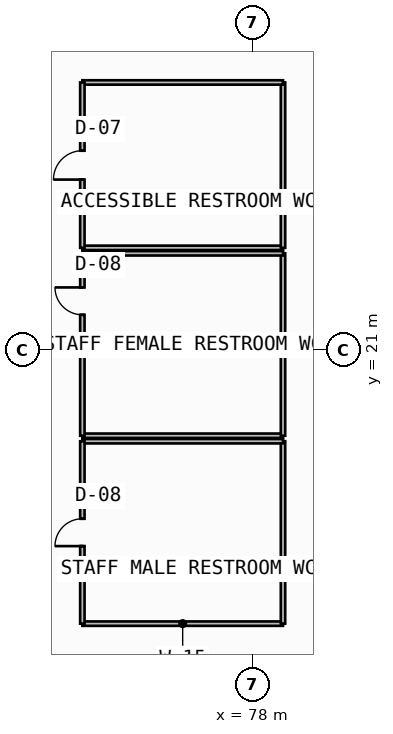
"""IFC4 building model, lengths in metres.
Left out: names, types, materials, properties, quantities, classifications, styles, units other than length and angle.
Written with IfcOpenShell. Run it as: python <this file> out.ifc"""

import sys

from ifc_helpers import new_model, si_unit, direction, frame, frame_2d, origin, place, context, subcontext, project, spatial, rectangle, extrude, element, fill, save


model = new_model("IFC4")
c1 = context("Model", 3, precision=1e-05, world=origin(), true_north=direction((0.0, 1.0)))
c2 = subcontext(c1, "Body", "Model", "MODEL_VIEW")
j1 = project(units=[si_unit("LENGTHUNIT", "METRE"), si_unit("PLANEANGLEUNIT", "RADIAN")], contexts=[c1])
p1 = place(None, origin())
s1 = spatial("IfcSite", under=j1, at=p1, CompositionType="ELEMENT")
p2 = place(p1, origin())
s2 = spatial("IfcBuilding", under=s1, at=p2, CompositionType="ELEMENT")
p3 = place(p2, frame((0.0, 0.0, -6.0)))
s3 = spatial("IfcBuildingStorey", under=s2, at=p3, CompositionType="ELEMENT", Elevation=-6.0)
p4 = place(p3, frame((72.4, 12.0, 0.0), z_axis=(0.0, 0.0, 1.0), x_axis=(1.0, 0.0, 0.0)))
e1 = element("IfcWall", 1, at=p4, inside=s3, PredefinedType="PARTITIONING", context=c2, shape_type="SweptSolid", body=[
    extrude(rectangle(XDim=6.6, YDim=0.145, at=frame_2d((3.3, 0.0))), origin(), (0.0, 0.0, 1.0), 5.085),
])
p5 = place(p3, frame((79.0, 12.0, 0.0), z_axis=(0.0, 0.0, 1.0), x_axis=(0.0, 1.0, 0.0)))
e2 = element("IfcWall", 2, at=p5, inside=s3, PredefinedType="PARTITIONING", context=c2, shape_type="SweptSolid", body=[
    extrude(rectangle(XDim=6.0, YDim=0.145, at=frame_2d((3.0, 0.0))), origin(), (0.0, 0.0, 1.0), 5.6),
])
p6 = place(p3, frame((79.0, 18.0, 0.0), z_axis=(0.0, 0.0, 1.0), x_axis=(-1.0, 0.0, 0.0)))
e3 = element("IfcWall", 3, at=p6, inside=s3, PredefinedType="PARTITIONING", context=c2, shape_type="SweptSolid", body=[
    extrude(rectangle(XDim=6.6, YDim=0.145, at=frame_2d((3.3, 0.0))), origin(), (0.0, 0.0, 1.0), 5.085),
])
p7 = place(p3, frame((72.4, 18.0, 0.0), z_axis=(0.0, 0.0, 1.0), x_axis=(0.0, -1.0, 0.0)))
e4 = element("IfcWall", 4, at=p7, inside=s3, PredefinedType="PARTITIONING", context=c2, shape_type="SweptSolid", body=[
    extrude(rectangle(XDim=6.0, YDim=0.145, at=frame_2d((3.0, 0.0))), origin(), (0.0, 0.0, 1.0), 5.6),
])
p8 = place(p7, frame((2.55, 0.0, 0.0)))
e5 = element("IfcOpeningElement", 5, at=p8, cuts=e4, PredefinedType="OPENING", context=c2, shape_type="SweptSolid", body=[
    extrude(rectangle(XDim=0.9, YDim=2.1, at=frame_2d((0.45, 1.05))), frame((0.0, 0.083, 0.0), z_axis=(0.0, -1.0, 0.0), x_axis=(1.0, 0.0, 0.0)), (0.0, 0.0, 1.0), 0.165),
])
p9 = place(p3, frame((72.4, 18.18, 0.0), z_axis=(0.0, 0.0, 1.0), x_axis=(1.0, 0.0, 0.0)))
e6 = element("IfcWall", 6, at=p9, inside=s3, PredefinedType="PARTITIONING", context=c2, shape_type="SweptSolid", body=[
    extrude(rectangle(XDim=6.6, YDim=0.145, at=frame_2d((3.3, 0.0))), origin(), (0.0, 0.0, 1.0), 5.085),
])
p10 = place(p3, frame((79.0, 18.18, 0.0), z_axis=(0.0, 0.0, 1.0), x_axis=(0.0, 1.0, 0.0)))
e7 = element("IfcWall", 7, at=p10, inside=s3, PredefinedType="PARTITIONING", context=c2, shape_type="SweptSolid", body=[
    extrude(rectangle(XDim=6.0, YDim=0.145, at=frame_2d((3.0, 0.0))), origin(), (0.0, 0.0, 1.0), 4.885),
])
p11 = place(p3, frame((79.0, 24.18, 0.0), z_axis=(0.0, 0.0, 1.0), x_axis=(-1.0, 0.0, 0.0)))
e8 = element("IfcWall", 8, at=p11, inside=s3, PredefinedType="PARTITIONING", context=c2, shape_type="SweptSolid", body=[
    extrude(rectangle(XDim=6.6, YDim=0.145, at=frame_2d((3.3, 0.0))), origin(), (0.0, 0.0, 1.0), 5.6),
])
p12 = place(p3, frame((72.4, 24.18, 0.0), z_axis=(0.0, 0.0, 1.0), x_axis=(0.0, -1.0, 0.0)))
e9 = element("IfcWall", 9, at=p12, inside=s3, PredefinedType="PARTITIONING", context=c2, shape_type="SweptSolid", body=[
    extrude(rectangle(XDim=6.0, YDim=0.145, at=frame_2d((3.0, 0.0))), origin(), (0.0, 0.0, 1.0), 4.885),
])
p13 = place(p12, frame((1.122, 0.0, 0.0)))
e10 = element("IfcOpeningElement", 10, at=p13, cuts=e9, PredefinedType="OPENING", context=c2, shape_type="SweptSolid", body=[
    extrude(rectangle(XDim=0.9, YDim=2.1, at=frame_2d((0.45, 1.05))), frame((0.0, 0.083, 0.0), z_axis=(0.0, -1.0, 0.0), x_axis=(1.0, 0.0, 0.0)), (0.0, 0.0, 1.0), 0.165),
])
p14 = place(p3, frame((72.4, 24.36, 0.0), z_axis=(0.0, 0.0, 1.0), x_axis=(1.0, 0.0, 0.0)))
e11 = element("IfcWall", 11, at=p14, inside=s3, PredefinedType="PARTITIONING", context=c2, shape_type="SweptSolid", body=[
    extrude(rectangle(XDim=6.6, YDim=0.145, at=frame_2d((3.3, 0.0))), origin(), (0.0, 0.0, 1.0), 5.6),
])
p15 = place(p3, frame((79.0, 24.36, 0.0), z_axis=(0.0, 0.0, 1.0), x_axis=(0.0, 1.0, 0.0)))
e12 = element("IfcWall", 12, at=p15, inside=s3, PredefinedType="PARTITIONING", context=c2, shape_type="SweptSolid", body=[
    extrude(rectangle(XDim=5.44, YDim=0.145, at=frame_2d((2.72, 0.0))), origin(), (0.0, 0.0, 1.0), 5.6),
])
p16 = place(p3, frame((79.0, 29.8, 0.0), z_axis=(0.0, 0.0, 1.0), x_axis=(-1.0, 0.0, 0.0)))
e13 = element("IfcWall", 13, at=p16, inside=s3, PredefinedType="PARTITIONING", context=c2, shape_type="SweptSolid", body=[
    extrude(rectangle(XDim=6.6, YDim=0.145, at=frame_2d((3.3, 0.0))), origin(), (0.0, 0.0, 1.0), 5.6),
])
p17 = place(p3, frame((72.4, 29.8, 0.0), z_axis=(0.0, 0.0, 1.0), x_axis=(0.0, -1.0, 0.0)))
e14 = element("IfcWall", 14, at=p17, inside=s3, PredefinedType="PARTITIONING", context=c2, shape_type="SweptSolid", body=[
    extrude(rectangle(XDim=5.44, YDim=0.145, at=frame_2d((2.72, 0.0))), origin(), (0.0, 0.0, 1.0), 5.6),
])
p18 = place(p17, frame((2.245, 0.0, 0.0)))
e15 = element("IfcOpeningElement", 15, at=p18, cuts=e14, PredefinedType="OPENING", context=c2, shape_type="SweptSolid", body=[
    extrude(rectangle(XDim=0.95, YDim=2.15, at=frame_2d((0.475, 1.075))), frame((0.0, 0.083, 0.0), z_axis=(0.0, -1.0, 0.0), x_axis=(1.0, 0.0, 0.0)), (0.0, 0.0, 1.0), 0.165),
])
p19 = place(p8, frame((0.9, 0.0, 0.0), z_axis=(0.0, 0.0, 1.0), x_axis=(-1.0, 0.0, 0.0)))
e16 = element("IfcDoor", 16, at=p19, inside=s3, OperationType="SINGLE_SWING_LEFT", PredefinedType="DOOR", context=c2, shape_type="SweptSolid", body=[
    extrude(rectangle(XDim=0.9, YDim=2.1, at=frame_2d((0.45, 1.05))), frame((0.0, 0.025, 0.0), z_axis=(0.0, -1.0, 0.0), x_axis=(1.0, 0.0, 0.0)), (0.0, 0.0, 1.0), 0.05),
])
fill(e5, e16)
p20 = place(p13, frame((0.9, 0.0, 0.0), z_axis=(0.0, 0.0, 1.0), x_axis=(-1.0, 0.0, 0.0)))
e17 = element("IfcDoor", 17, at=p20, inside=s3, OperationType="SINGLE_SWING_RIGHT", PredefinedType="DOOR", context=c2, shape_type="SweptSolid", body=[
    extrude(rectangle(XDim=0.9, YDim=2.1, at=frame_2d((0.45, 1.05))), frame((0.0, 0.025, 0.0), z_axis=(0.0, -1.0, 0.0), x_axis=(1.0, 0.0, 0.0)), (0.0, 0.0, 1.0), 0.05),
])
fill(e10, e17)
p21 = place(p18, frame((0.95, 0.0, 0.0), z_axis=(0.0, 0.0, 1.0), x_axis=(-1.0, 0.0, 0.0)))
e18 = element("IfcDoor", 18, at=p21, inside=s3, OperationType="SINGLE_SWING_LEFT", PredefinedType="DOOR", context=c2, shape_type="SweptSolid", body=[
    extrude(rectangle(XDim=0.95, YDim=2.15, at=frame_2d((0.475, 1.075))), frame((0.0, 0.025, 0.0), z_axis=(0.0, -1.0, 0.0), x_axis=(1.0, 0.0, 0.0)), (0.0, 0.0, 1.0), 0.05),
])
fill(e15, e18)
save(model, sys.argv[1])
